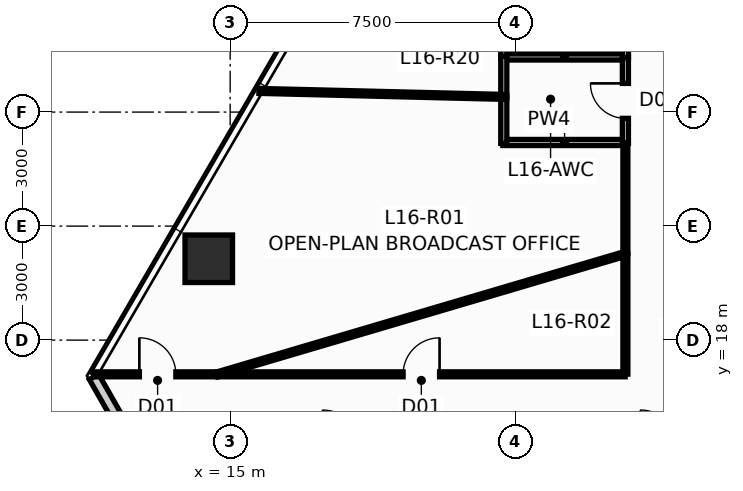
"""IFC4 building model, lengths in metres.
Left out: names, types, materials, properties, quantities, classifications, styles, units other than length and angle.
Written with IfcOpenShell. Run it as: python <this file> out.ifc"""

import sys

from ifc_helpers import new_model, si_unit, direction, frame, frame_2d, origin, origin_2d, place, context, subcontext, project, spatial, rectangle, hollow_rectangle, extrude, source, transform, mapped, element, fill, save


model = new_model("IFC4")
c1 = context("Model", 3, precision=1e-05, world=origin(), true_north=direction((0.0, 1.0)))
c2 = subcontext(c1, "Body", "Model", "MODEL_VIEW")
j1 = project(units=[si_unit("LENGTHUNIT", "METRE"), si_unit("PLANEANGLEUNIT", "RADIAN")], contexts=[c1])
p1 = place(None, origin())
s1 = spatial("IfcSite", under=j1, at=p1, CompositionType="ELEMENT")
p2 = place(p1, origin())
s2 = spatial("IfcBuilding", under=s1, at=p2, CompositionType="ELEMENT")
p3 = place(p2, frame((0.0, 0.0, 64.1)))
s3 = spatial("IfcBuildingStorey", under=s2, at=p3, CompositionType="ELEMENT", Elevation=64.1)
m1 = source(origin(), c2, "Body", "SweptSolid", [
    extrude(hollow_rectangle(XDim=1.25, YDim=1.25, WallThickness=0.07, at=origin_2d()), origin(), (0.0, 0.0, 1.0), 3.651),
])
p4 = place(p3, frame((14.436, 20.141, 0.0), z_axis=(0.010498643418, -0.021599119899, 0.999711586662), x_axis=(0.899383059768, 0.437161425336, 0.0)))
e1 = element("IfcColumn", 1, at=p4, inside=s3, PredefinedType="COLUMN", context=c2, shape_type="MappedRepresentation", body=[
    mapped(m1, transform((0.0, 0.0, 0.0), scale=1.0)),
])
p5 = place(p3, frame((18.559, 4.529, 0.0), z_axis=(0.0, 0.0, 1.0), x_axis=(-0.496003831899, 0.868320331871, 0.0)))
e2 = element("IfcWall", 2, at=p5, inside=s3, PredefinedType="STANDARD", context=c2, shape_type="SweptSolid", body=[
    extrude(rectangle(XDim=14.401, YDim=0.28, at=frame_2d((7.201, 0.0))), origin(), (0.0, 0.0, 1.0), 3.4),
])
p6 = place(p5, frame((7.65, 0.0, 0.9)))
e3 = element("IfcOpeningElement", 3, at=p6, cuts=e2, PredefinedType="OPENING", context=c2, shape_type="SweptSolid", body=[
    extrude(rectangle(XDim=1.8, YDim=1.8, at=frame_2d((0.9, 0.9))), frame((0.0, 0.152, 0.0), z_axis=(0.0, -1.0, 0.0), x_axis=(1.0, 0.0, 0.0)), (0.0, 0.0, 1.0), 0.304),
])
for number, where, z_axis, x_axis in (
    (4, (22.175, 23.2, 0.0), (0.0, 0.0, 1.0), (1.0, 0.0, 0.0)),
    (5, (22.175, 25.45, 0.0), (0.0, 0.0, 1.0), (1.0, 0.0, 0.0)),
):
    element("IfcWall", number, at=place(p3, frame(where, z_axis=z_axis, x_axis=x_axis)), inside=s3, PredefinedType="PLUMBINGWALL", context=c2, shape_type="SweptSolid", body=[
        extrude(rectangle(XDim=3.25, YDim=0.16, at=frame_2d((1.625, 0.0))), origin(), (0.0, 0.0, 1.0), 3.4),
    ])
p7 = place(p3, frame((25.4, 23.175, 0.0), z_axis=(0.0, 0.0, 1.0), x_axis=(0.0, 1.0, 0.0)))
e6 = element("IfcWall", 6, at=p7, inside=s3, PredefinedType="PLUMBINGWALL", context=c2, shape_type="SweptSolid", body=[
    extrude(rectangle(XDim=2.3, YDim=0.16, at=frame_2d((1.15, 0.0))), origin(), (0.0, 0.0, 1.0), 3.026),
])
p8 = place(p7, frame((0.66, 0.0, 0.0)))
e7 = element("IfcOpeningElement", 7, at=p8, cuts=e6, PredefinedType="OPENING", context=c2, shape_type="SweptSolid", body=[
    extrude(rectangle(XDim=0.92, YDim=2.1, at=frame_2d((0.46, 1.05))), frame((0.0, 0.092, 0.0), z_axis=(0.0, -1.0, 0.0), x_axis=(1.0, 0.0, 0.0)), (0.0, 0.0, 1.0), 0.184),
])
p9 = place(p3, frame((25.4, 25.425, 0.0), z_axis=(0.0, 0.0, 1.0), x_axis=(0.0, 1.0, 0.0)))
e8 = element("IfcWall", 8, at=p9, inside=s3, PredefinedType="PLUMBINGWALL", context=c2, shape_type="SweptSolid", body=[
    extrude(rectangle(XDim=2.3, YDim=0.16, at=frame_2d((1.15, 0.0))), origin(), (0.0, 0.0, 1.0), 3.4),
])
p10 = place(p9, frame((0.66, 0.0, 0.0)))
e9 = element("IfcOpeningElement", 9, at=p10, cuts=e8, PredefinedType="OPENING", context=c2, shape_type="SweptSolid", body=[
    extrude(rectangle(XDim=0.92, YDim=2.1, at=frame_2d((0.46, 1.05))), frame((0.0, 0.092, 0.0), z_axis=(0.0, -1.0, 0.0), x_axis=(1.0, 0.0, 0.0)), (0.0, 0.0, 1.0), 0.184),
])
p11 = place(p3, frame((22.2, 25.425, 0.0), z_axis=(0.0, 0.0, 1.0), x_axis=(0.0, 1.0, 0.0)))
e10 = element("IfcWall", 10, at=p11, inside=s3, PredefinedType="PLUMBINGWALL", context=c2, shape_type="SweptSolid", body=[
    extrude(rectangle(XDim=2.3, YDim=0.16, at=frame_2d((1.15, 0.0))), origin(), (0.0, 0.0, 1.0), 3.026),
])
p12 = place(p3, frame((22.2, 24.425, 0.0), z_axis=(0.0, 0.0, 1.0), x_axis=(0.0, -1.0, 0.0)))
e11 = element("IfcWall", 11, at=p12, inside=s3, PredefinedType="PLUMBINGWALL", context=c2, shape_type="SweptSolid", body=[
    extrude(rectangle(XDim=1.25, YDim=0.16, at=frame_2d((0.625, 0.0))), origin(), (0.0, 0.0, 1.0), 3.4),
])
p13 = place(p3, frame((22.2, 24.375, 0.0), z_axis=(0.0, 0.0, 1.0), x_axis=(0.0, 1.0, 0.0)))
e12 = element("IfcWall", 12, at=p13, inside=s3, PredefinedType="PLUMBINGWALL", context=c2, shape_type="SweptSolid", body=[
    extrude(rectangle(XDim=1.1, YDim=0.16, at=frame_2d((0.55, 0.0))), origin(), (0.0, 0.0, 1.0), 3.026),
])
p14 = place(p3, frame((14.665, 17.101, 0.0), z_axis=(0.0, 0.0, 1.0), x_axis=(0.959072405606, 0.283160945055, 0.0)))
e13 = element("IfcWall", 13, at=p14, inside=s3, PredefinedType="PARTITIONING", context=c2, shape_type="SweptSolid", body=[
    extrude(rectangle(XDim=11.188, YDim=0.13, at=frame_2d((5.594, 0.0))), origin(), (0.0, 0.0, 1.0), 3.4),
])
p15 = place(p3, frame((14.665, 17.1, 0.0), z_axis=(0.0, 0.0, 1.0), x_axis=(1.0, 0.0, 0.0)))
e14 = element("IfcWall", 14, at=p15, inside=s3, PredefinedType="PARTITIONING", context=c2, shape_type="SweptSolid", body=[
    extrude(rectangle(XDim=10.73, YDim=0.13, at=frame_2d((5.365, 0.0))), origin(), (0.0, 0.0, 1.0), 3.4),
])
p16 = place(p15, frame((4.885, 0.0, 0.0)))
e15 = element("IfcOpeningElement", 15, at=p16, cuts=e14, PredefinedType="OPENING", context=c2, shape_type="SweptSolid", body=[
    extrude(rectangle(XDim=0.96, YDim=2.15, at=frame_2d((0.48, 1.075))), frame((0.0, 0.077, 0.0), z_axis=(0.0, -1.0, 0.0), x_axis=(1.0, 0.0, 0.0)), (0.0, 0.0, 1.0), 0.154),
])
p17 = place(p3, frame((15.757, 24.557, 0.0), z_axis=(0.0, 0.0, 1.0), x_axis=(0.99970097515, -0.024453226477, 0.0)))
e16 = element("IfcWall", 16, at=p17, inside=s3, PredefinedType="PARTITIONING", context=c2, shape_type="SweptSolid", body=[
    extrude(rectangle(XDim=6.44, YDim=0.13, at=frame_2d((3.22, 0.0))), origin(), (0.0, 0.0, 1.0), 3.4),
])
p18 = place(p3, frame((11.418, 17.1, 0.0), z_axis=(0.0, 0.0, 1.0), x_axis=(1.0, 0.0, 0.0)))
e17 = element("IfcWall", 17, at=p18, inside=s3, PredefinedType="PARTITIONING", context=c2, shape_type="SweptSolid", body=[
    extrude(rectangle(XDim=3.237, YDim=0.13, at=frame_2d((1.618, 0.0))), origin(), (0.0, 0.0, 1.0), 3.4),
])
p19 = place(p18, frame((1.192, 0.0, 0.0)))
e18 = element("IfcOpeningElement", 18, at=p19, cuts=e17, PredefinedType="OPENING", context=c2, shape_type="SweptSolid", body=[
    extrude(rectangle(XDim=0.96, YDim=2.15, at=frame_2d((0.48, 1.075))), frame((0.0, 0.077, 0.0), z_axis=(0.0, -1.0, 0.0), x_axis=(1.0, 0.0, 0.0)), (0.0, 0.0, 1.0), 0.154),
])
p20 = place(p3, frame((25.4, 17.105, 0.0), z_axis=(0.0, 0.0, 1.0), x_axis=(0.0, 1.0, 0.0)))
e19 = element("IfcWall", 19, at=p20, inside=s3, PredefinedType="PARTITIONING", context=c2, shape_type="SweptSolid", body=[
    extrude(rectangle(XDim=3.16, YDim=0.13, at=frame_2d((1.58, 0.0))), origin(), (0.0, 0.0, 1.0), 3.026),
])
p21 = place(p3, frame((25.4, 20.275, 0.0), z_axis=(0.0, 0.0, 1.0), x_axis=(0.0, 1.0, 0.0)))
e20 = element("IfcWall", 20, at=p21, inside=s3, PredefinedType="PARTITIONING", context=c2, shape_type="SweptSolid", body=[
    extrude(rectangle(XDim=2.92, YDim=0.13, at=frame_2d((1.46, 0.0))), origin(), (0.0, 0.0, 1.0), 3.026),
])
p22 = place(p8, origin())
e21 = element("IfcDoor", 21, at=p22, inside=s3, OperationType="SINGLE_SWING_RIGHT", PredefinedType="DOOR", context=c2, shape_type="SweptSolid", body=[
    extrude(rectangle(XDim=0.92, YDim=2.1, at=frame_2d((0.46, 1.05))), frame((0.0, 0.025, 0.0), z_axis=(0.0, -1.0, 0.0), x_axis=(1.0, 0.0, 0.0)), (0.0, 0.0, 1.0), 0.05),
])
fill(e7, e21)
p23 = place(p16, origin())
e22 = element("IfcDoor", 22, at=p23, inside=s3, OperationType="SINGLE_SWING_RIGHT", PredefinedType="DOOR", context=c2, shape_type="SweptSolid", body=[
    extrude(rectangle(XDim=0.96, YDim=2.15, at=frame_2d((0.48, 1.075))), frame((0.0, 0.025, 0.0), z_axis=(0.0, -1.0, 0.0), x_axis=(1.0, 0.0, 0.0)), (0.0, 0.0, 1.0), 0.05),
])
fill(e15, e22)
p24 = place(p19, origin())
e23 = element("IfcDoor", 23, at=p24, inside=s3, OperationType="SINGLE_SWING_LEFT", PredefinedType="DOOR", context=c2, shape_type="SweptSolid", body=[
    extrude(rectangle(XDim=0.96, YDim=2.15, at=frame_2d((0.48, 1.075))), frame((0.0, 0.025, 0.0), z_axis=(0.0, -1.0, 0.0), x_axis=(1.0, 0.0, 0.0)), (0.0, 0.0, 1.0), 0.05),
])
fill(e18, e23)
save(model, sys.argv[1])
